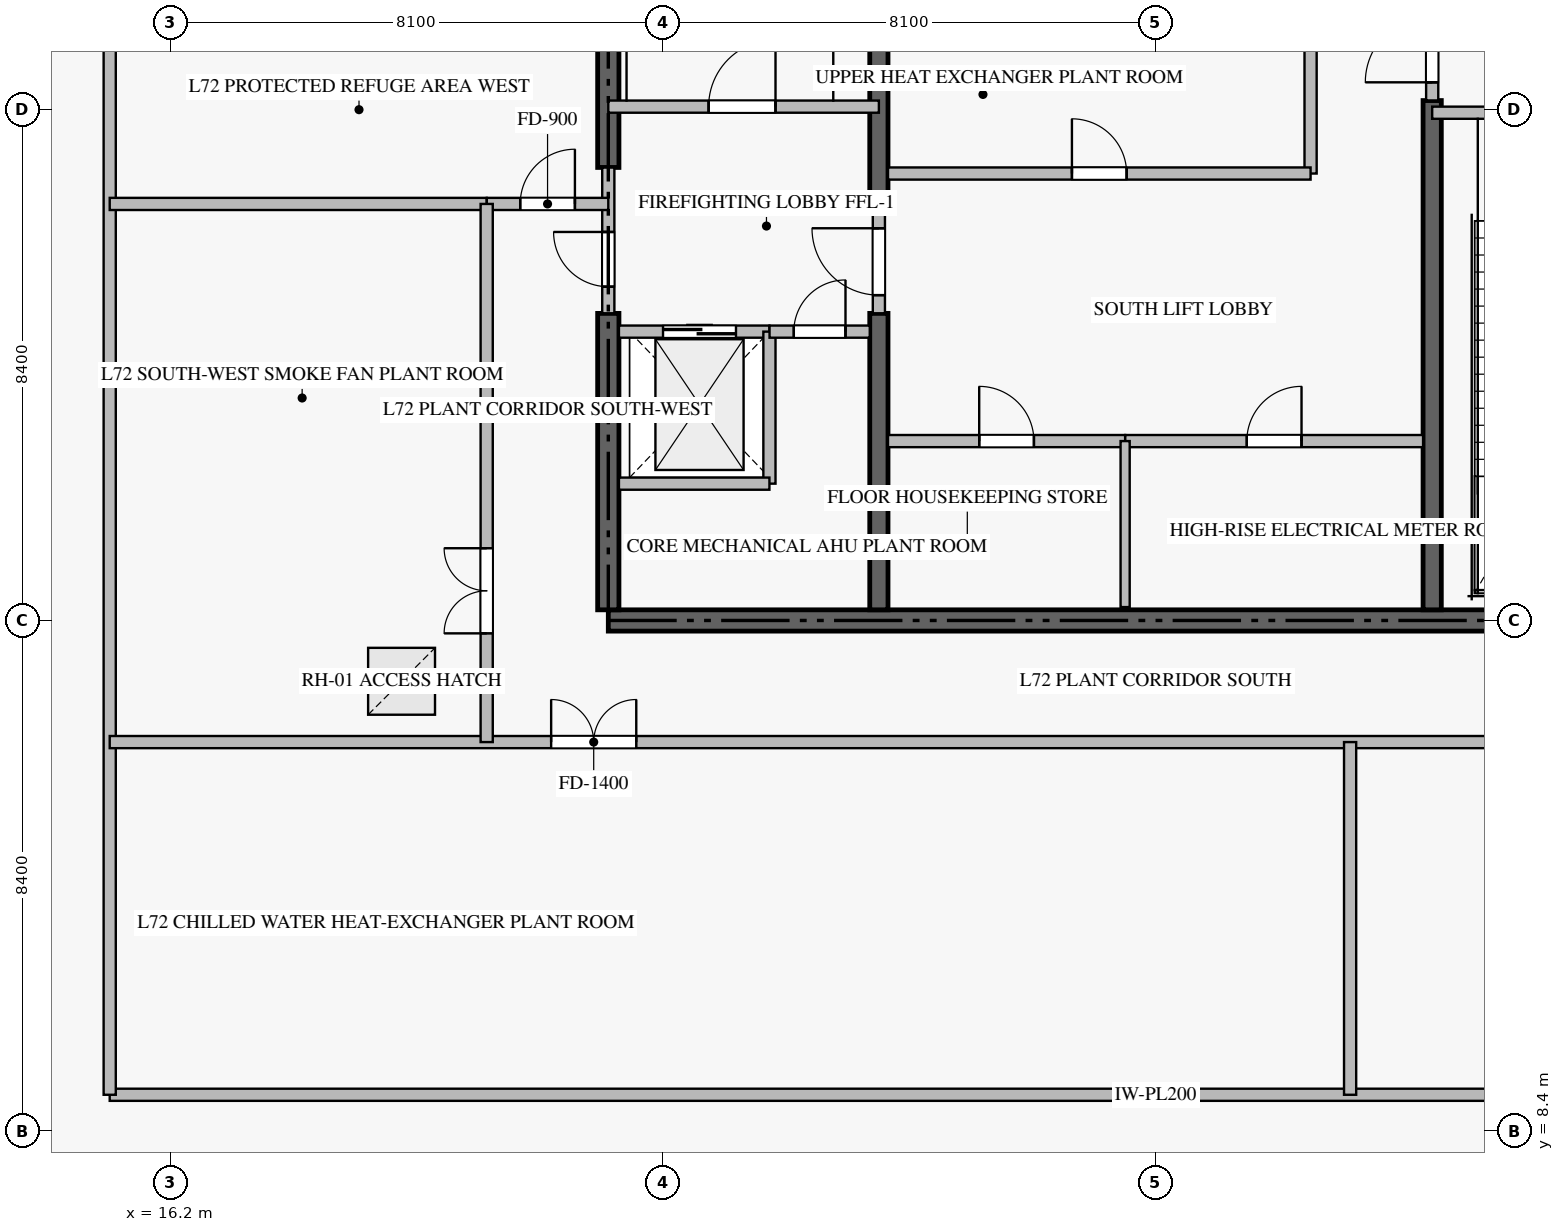
"""IFC4 building model, lengths in metres.
Left out: names, types, materials, properties, quantities, classifications, styles, units other than length and angle.
Written with IfcOpenShell. Run it as: python <this file> out.ifc"""

import sys

from ifc_helpers import new_model, si_unit, direction, frame, frame_2d, origin, origin_2d, place, context, subcontext, project, spatial, rectangle, extrude, source, transform, mapped, element, fill, save


model = new_model("IFC4")
c1 = context("Model", 3, precision=1e-05, world=origin(), true_north=direction((0.0, 1.0)))
c2 = subcontext(c1, "Body", "Model", "MODEL_VIEW")
j1 = project(units=[si_unit("LENGTHUNIT", "METRE"), si_unit("PLANEANGLEUNIT", "RADIAN")], contexts=[c1])
p1 = place(None, origin())
s1 = spatial("IfcSite", under=j1, at=p1, CompositionType="ELEMENT")
p2 = place(p1, origin())
s2 = spatial("IfcBuilding", under=s1, at=p2, CompositionType="ELEMENT")
p3 = place(p2, frame((0.0, 0.0, 287.45)))
s3 = spatial("IfcBuildingStorey", under=s2, at=p3, CompositionType="ELEMENT", Elevation=287.45)
p4 = place(p3, frame((23.4, 16.8, -0.44), z_axis=(0.0, 0.0, 1.0), x_axis=(1.0, 0.0, 0.0)))
e1 = element("IfcWall", 1, at=p4, inside=s3, PredefinedType="SHEAR", context=c2, shape_type="SweptSolid", body=[
    extrude(rectangle(XDim=18.0, YDim=0.35, at=frame_2d((9.0, 0.0))), origin(), (0.0, 0.0, 1.0), 6.178),
])
p5 = place(p3, frame((23.4, 16.975, -0.44), z_axis=(0.0, 0.0, 1.0), x_axis=(0.0, 1.0, 0.0)))
e2 = element("IfcWall", 2, at=p5, inside=s3, PredefinedType="SHEAR", context=c2, shape_type="SweptSolid", body=[
    extrude(rectangle(XDim=4.875, YDim=0.35, at=frame_2d((2.438, 0.0))), origin(), (0.0, 0.0, 1.0), 6.178),
])
p6 = place(p3, frame((23.4, 24.25, -0.44), z_axis=(0.0, 0.0, 1.0), x_axis=(0.0, 1.0, 0.0)))
e3 = element("IfcWall", 3, at=p6, inside=s3, PredefinedType="SHEAR", context=c2, shape_type="SweptSolid", body=[
    extrude(rectangle(XDim=9.175, YDim=0.35, at=frame_2d((4.587, 0.0))), origin(), (0.0, 0.0, 1.0), 6.178),
])
p7 = place(p3, frame((27.85, 16.975, -0.44), z_axis=(0.0, 0.0, 1.0), x_axis=(0.0, 1.0, 0.0)))
e4 = element("IfcWall", 4, at=p7, inside=s3, PredefinedType="SHEAR", context=c2, shape_type="SweptSolid", body=[
    extrude(rectangle(XDim=4.875, YDim=0.3, at=frame_2d((2.438, 0.0))), origin(), (0.0, 0.0, 1.0), 6.178),
])
p8 = place(p3, frame((27.85, 23.55, -0.44), z_axis=(0.0, 0.0, 1.0), x_axis=(0.0, 1.0, 0.0)))
e5 = element("IfcWall", 5, at=p8, inside=s3, PredefinedType="SHEAR", context=c2, shape_type="SweptSolid", body=[
    extrude(rectangle(XDim=9.875, YDim=0.3, at=frame_2d((4.938, 0.0))), origin(), (0.0, 0.0, 1.0), 6.178),
])
p9 = place(p3, frame((36.95, 16.975, -0.44), z_axis=(0.0, 0.0, 1.0), x_axis=(0.0, 1.0, 0.0)))
e6 = element("IfcWall", 6, at=p9, inside=s3, PredefinedType="SHEAR", context=c2, shape_type="SweptSolid", body=[
    extrude(rectangle(XDim=8.375, YDim=0.3, at=frame_2d((4.188, 0.0))), origin(), (0.0, 0.0, 1.0), 6.178),
])
p10 = place(p3, frame((23.4, 25.25, 0.0), z_axis=(0.0, 0.0, 1.0), x_axis=(1.0, 0.0, 0.0)))
e7 = element("IfcWall", 7, at=p10, inside=s3, PredefinedType="STANDARD", context=c2, shape_type="SweptSolid", body=[
    extrude(rectangle(XDim=4.45, YDim=0.2, at=frame_2d((2.225, 0.0))), origin(), (0.0, 0.0, 1.0), 5.74),
])
p11 = place(p10, frame((1.65, 0.0, 0.0)))
e8 = element("IfcOpeningElement", 8, at=p11, cuts=e7, PredefinedType="OPENING", context=c2, shape_type="SweptSolid", body=[
    extrude(rectangle(XDim=1.1, YDim=2.15, at=frame_2d((0.55, 1.075))), frame((0.0, 0.11, 0.0), z_axis=(0.0, -1.0, 0.0), x_axis=(1.0, 0.0, 0.0)), (0.0, 0.0, 1.0), 0.22),
])
p12 = place(p3, frame((36.95, 25.15, 0.0), z_axis=(0.0, 0.0, 1.0), x_axis=(1.0, 0.0, 0.0)))
e9 = element("IfcWall", 9, at=p12, inside=s3, PredefinedType="STANDARD", context=c2, shape_type="SweptSolid", body=[
    extrude(rectangle(XDim=4.45, YDim=0.2, at=frame_2d((2.225, 0.0))), origin(), (0.0, 0.0, 1.0), 5.74),
])
p13 = place(p12, frame((1.65, 0.0, 0.0)))
e10 = element("IfcOpeningElement", 10, at=p13, cuts=e9, PredefinedType="OPENING", context=c2, shape_type="SweptSolid", body=[
    extrude(rectangle(XDim=1.1, YDim=2.15, at=frame_2d((0.55, 1.075))), frame((0.0, 0.11, 0.0), z_axis=(0.0, -1.0, 0.0), x_axis=(1.0, 0.0, 0.0)), (0.0, 0.0, 1.0), 0.22),
])
p14 = place(p3, frame((23.575, 21.55, 0.0), z_axis=(0.0, 0.0, 1.0), x_axis=(1.0, 0.0, 0.0)))
e11 = element("IfcWall", 11, at=p14, inside=s3, PredefinedType="STANDARD", context=c2, shape_type="SweptSolid", body=[
    extrude(rectangle(XDim=2.475, YDim=0.2, at=frame_2d((1.238, 0.0))), origin(), (0.0, 0.0, 1.0), 5.74),
])
p15 = place(p14, frame((0.725, 0.0, 0.0)))
e12 = element("IfcOpeningElement", 12, at=p15, cuts=e11, PredefinedType="OPENING", context=c2, shape_type="SweptSolid", body=[
    extrude(rectangle(XDim=1.2, YDim=2.2, at=frame_2d((0.6, 1.1))), frame((0.0, 0.11, 0.0), z_axis=(0.0, -1.0, 0.0), x_axis=(1.0, 0.0, 0.0)), (0.0, 0.0, 1.0), 0.22),
])
p16 = place(p3, frame((26.05, 19.05, 0.0), z_axis=(0.0, 0.0, 1.0), x_axis=(0.0, 1.0, 0.0)))
e13 = element("IfcWall", 13, at=p16, inside=s3, PredefinedType="STANDARD", context=c2, shape_type="SweptSolid", body=[
    extrude(rectangle(XDim=2.5, YDim=0.2, at=frame_2d((1.25, 0.0))), origin(), (0.0, 0.0, 1.0), 5.74),
])
p17 = place(p3, frame((23.575, 19.05, 0.0), z_axis=(0.0, 0.0, 1.0), x_axis=(1.0, 0.0, 0.0)))
e14 = element("IfcWall", 14, at=p17, inside=s3, PredefinedType="STANDARD", context=c2, shape_type="SweptSolid", body=[
    extrude(rectangle(XDim=2.475, YDim=0.2, at=frame_2d((1.238, 0.0))), origin(), (0.0, 0.0, 1.0), 5.74),
])
p18 = place(p3, frame((26.052, 21.55, 0.0), z_axis=(0.0, 0.0, 1.0), x_axis=(1.0, 0.0, 0.0)))
e15 = element("IfcWall", 15, at=p18, inside=s3, PredefinedType="STANDARD", context=c2, shape_type="SweptSolid", body=[
    extrude(rectangle(XDim=1.648, YDim=0.2, at=frame_2d((0.824, 0.0))), origin(), (0.0, 0.0, 1.0), 5.74),
])
p19 = place(p18, frame((0.399, 0.0, 0.0)))
e16 = element("IfcOpeningElement", 16, at=p19, cuts=e15, PredefinedType="OPENING", context=c2, shape_type="SweptSolid", body=[
    extrude(rectangle(XDim=0.85, YDim=2.1, at=frame_2d((0.425, 1.05))), frame((0.0, 0.11, 0.0), z_axis=(0.0, -1.0, 0.0), x_axis=(1.0, 0.0, 0.0)), (0.0, 0.0, 1.0), 0.22),
])
p20 = place(p3, frame((23.4, 21.852, 0.0), z_axis=(0.0, 0.0, 1.0), x_axis=(0.0, 1.0, 0.0)))
e17 = element("IfcWall", 17, at=p20, inside=s3, PredefinedType="STANDARD", context=c2, shape_type="SweptSolid", body=[
    extrude(rectangle(XDim=2.396, YDim=0.2, at=frame_2d((1.198, 0.0))), origin(), (0.0, 0.0, 1.0), 5.74),
])
p21 = place(p20, frame((0.437, 0.0, 0.0)))
e18 = element("IfcOpeningElement", 18, at=p21, cuts=e17, PredefinedType="OPENING", context=c2, shape_type="SweptSolid", body=[
    extrude(rectangle(XDim=0.9, YDim=2.1, at=frame_2d((0.45, 1.05))), frame((0.0, 0.11, 0.0), z_axis=(0.0, -1.0, 0.0), x_axis=(1.0, 0.0, 0.0)), (0.0, 0.0, 1.0), 0.22),
])
p22 = place(p3, frame((27.85, 21.852, 0.0), z_axis=(0.0, 0.0, 1.0), x_axis=(0.0, 1.0, 0.0)))
e19 = element("IfcWall", 19, at=p22, inside=s3, PredefinedType="STANDARD", context=c2, shape_type="SweptSolid", body=[
    extrude(rectangle(XDim=1.696, YDim=0.2, at=frame_2d((0.848, 0.0))), origin(), (0.0, 0.0, 1.0), 5.74),
])
p23 = place(p22, frame((0.298, 0.0, 0.0)))
e20 = element("IfcOpeningElement", 20, at=p23, cuts=e19, PredefinedType="OPENING", context=c2, shape_type="SweptSolid", body=[
    extrude(rectangle(XDim=1.1, YDim=2.15, at=frame_2d((0.55, 1.075))), frame((0.0, 0.11, 0.0), z_axis=(0.0, -1.0, 0.0), x_axis=(1.0, 0.0, 0.0)), (0.0, 0.0, 1.0), 0.22),
])
p24 = place(p3, frame((36.95, 25.352, 0.0), z_axis=(0.0, 0.0, 1.0), x_axis=(0.0, 1.0, 0.0)))
e21 = element("IfcWall", 21, at=p24, inside=s3, PredefinedType="STANDARD", context=c2, shape_type="SweptSolid", body=[
    extrude(rectangle(XDim=1.696, YDim=0.2, at=frame_2d((0.848, 0.0))), origin(), (0.0, 0.0, 1.0), 5.74),
])
p25 = place(p24, frame((0.298, 0.0, 0.0)))
e22 = element("IfcOpeningElement", 22, at=p25, cuts=e21, PredefinedType="OPENING", context=c2, shape_type="SweptSolid", body=[
    extrude(rectangle(XDim=1.1, YDim=2.15, at=frame_2d((0.55, 1.075))), frame((0.0, 0.11, 0.0), z_axis=(0.0, -1.0, 0.0), x_axis=(1.0, 0.0, 0.0)), (0.0, 0.0, 1.0), 0.22),
])
p26 = place(p3, frame((28.0, 19.75, 0.0), z_axis=(0.0, 0.0, 1.0), x_axis=(1.0, 0.0, 0.0)))
e23 = element("IfcWall", 23, at=p26, inside=s3, PredefinedType="STANDARD", context=c2, shape_type="SweptSolid", body=[
    extrude(rectangle(XDim=3.9, YDim=0.2, at=frame_2d((1.95, 0.0))), origin(), (0.0, 0.0, 1.0), 5.74),
])
p27 = place(p26, frame((1.5, 0.0, 0.0)))
e24 = element("IfcOpeningElement", 24, at=p27, cuts=e23, PredefinedType="OPENING", context=c2, shape_type="SweptSolid", body=[
    extrude(rectangle(XDim=0.9, YDim=2.1, at=frame_2d((0.45, 1.05))), frame((0.0, 0.11, 0.0), z_axis=(0.0, -1.0, 0.0), x_axis=(1.0, 0.0, 0.0)), (0.0, 0.0, 1.0), 0.22),
])
p28 = place(p3, frame((31.902, 19.75, 0.0), z_axis=(0.0, 0.0, 1.0), x_axis=(1.0, 0.0, 0.0)))
e25 = element("IfcWall", 25, at=p28, inside=s3, PredefinedType="STANDARD", context=c2, shape_type="SweptSolid", body=[
    extrude(rectangle(XDim=4.898, YDim=0.2, at=frame_2d((2.449, 0.0))), origin(), (0.0, 0.0, 1.0), 5.74),
])
p29 = place(p28, frame((1.999, 0.0, 0.0)))
e26 = element("IfcOpeningElement", 26, at=p29, cuts=e25, PredefinedType="OPENING", context=c2, shape_type="SweptSolid", body=[
    extrude(rectangle(XDim=0.9, YDim=2.1, at=frame_2d((0.45, 1.05))), frame((0.0, 0.11, 0.0), z_axis=(0.0, -1.0, 0.0), x_axis=(1.0, 0.0, 0.0)), (0.0, 0.0, 1.0), 0.22),
])
p30 = place(p3, frame((31.9, 17.02, 0.0), z_axis=(0.0, 0.0, 1.0), x_axis=(0.0, 1.0, 0.0)))
e27 = element("IfcWall", 27, at=p30, inside=s3, PredefinedType="PARTITIONING", context=c2, shape_type="SweptSolid", body=[
    extrude(rectangle(XDim=2.73, YDim=0.15, at=frame_2d((1.365, 0.0))), origin(), (0.0, 0.0, 1.0), 5.74),
])
p31 = place(p3, frame((34.95, 24.15, 0.0), z_axis=(0.0, 0.0, 1.0), x_axis=(0.0, 1.0, 0.0)))
e28 = element("IfcWall", 28, at=p31, inside=s3, PredefinedType="STANDARD", context=c2, shape_type="SweptSolid", body=[
    extrude(rectangle(XDim=2.8, YDim=0.2, at=frame_2d((1.4, 0.0))), origin(), (0.0, 0.0, 1.0), 5.74),
])
p32 = place(p3, frame((28.0, 24.15, 0.0), z_axis=(0.0, 0.0, 1.0), x_axis=(1.0, 0.0, 0.0)))
e29 = element("IfcWall", 29, at=p32, inside=s3, PredefinedType="STANDARD", context=c2, shape_type="SweptSolid", body=[
    extrude(rectangle(XDim=6.95, YDim=0.2, at=frame_2d((3.475, 0.0))), origin(), (0.0, 0.0, 1.0), 5.74),
])
p33 = place(p32, frame((3.025, 0.0, 0.0)))
e30 = element("IfcOpeningElement", 30, at=p33, cuts=e29, PredefinedType="OPENING", context=c2, shape_type="SweptSolid", body=[
    extrude(rectangle(XDim=0.9, YDim=2.1, at=frame_2d((0.45, 1.05))), frame((0.0, 0.11, 0.0), z_axis=(0.0, -1.0, 0.0), x_axis=(1.0, 0.0, 0.0)), (0.0, 0.0, 1.0), 0.22),
])
p34 = place(p3, frame((15.2, 9.0, 0.0), z_axis=(0.0, 0.0, 1.0), x_axis=(1.0, 0.0, 0.0)))
e31 = element("IfcWall", 31, at=p34, inside=s3, PredefinedType="STANDARD", context=c2, shape_type="SweptSolid", body=[
    extrude(rectangle(XDim=34.4, YDim=0.2, at=frame_2d((17.2, 0.0))), origin(), (0.0, 0.0, 1.0), 5.74),
])
p35 = place(p3, frame((15.2, 9.0, 0.0), z_axis=(0.0, 0.0, 1.0), x_axis=(0.0, 1.0, 0.0)))
e32 = element("IfcWall", 32, at=p35, inside=s3, PredefinedType="STANDARD", context=c2, shape_type="SweptSolid", body=[
    extrude(rectangle(XDim=32.4, YDim=0.2, at=frame_2d((16.2, 0.0))), origin(), (0.0, 0.0, 1.0), 5.74),
])
p36 = place(p3, frame((15.2, 23.65, 0.0), z_axis=(0.0, 0.0, 1.0), x_axis=(1.0, 0.0, 0.0)))
e33 = element("IfcWall", 33, at=p36, inside=s3, PredefinedType="STANDARD", context=c2, shape_type="SweptSolid", body=[
    extrude(rectangle(XDim=6.2, YDim=0.2, at=frame_2d((3.1, 0.0))), origin(), (0.0, 0.0, 1.0), 5.74),
])
p37 = place(p3, frame((21.402, 23.65, 0.0), z_axis=(0.0, 0.0, 1.0), x_axis=(1.0, 0.0, 0.0)))
e34 = element("IfcWall", 34, at=p37, inside=s3, PredefinedType="STANDARD", context=c2, shape_type="SweptSolid", body=[
    extrude(rectangle(XDim=1.998, YDim=0.2, at=frame_2d((0.999, 0.0))), origin(), (0.0, 0.0, 1.0), 5.74),
])
p38 = place(p37, frame((0.549, 0.0, 0.0)))
e35 = element("IfcOpeningElement", 35, at=p38, cuts=e34, PredefinedType="OPENING", context=c2, shape_type="SweptSolid", body=[
    extrude(rectangle(XDim=0.9, YDim=2.1, at=frame_2d((0.45, 1.05))), frame((0.0, 0.11, 0.0), z_axis=(0.0, -1.0, 0.0), x_axis=(1.0, 0.0, 0.0)), (0.0, 0.0, 1.0), 0.22),
])
p39 = place(p3, frame((15.2, 14.8, 0.0), z_axis=(0.0, 0.0, 1.0), x_axis=(1.0, 0.0, 0.0)))
e36 = element("IfcWall", 36, at=p39, inside=s3, PredefinedType="STANDARD", context=c2, shape_type="SweptSolid", body=[
    extrude(rectangle(XDim=34.4, YDim=0.2, at=frame_2d((17.2, 0.0))), origin(), (0.0, 0.0, 1.0), 5.74),
])
p40 = place(p39, frame((7.26, 0.0, 0.0)))
e37 = element("IfcOpeningElement", 37, at=p40, cuts=e36, PredefinedType="OPENING", context=c2, shape_type="SweptSolid", body=[
    extrude(rectangle(XDim=1.4, YDim=2.2, at=frame_2d((0.7, 1.1))), frame((0.0, 0.11, 0.0), z_axis=(0.0, -1.0, 0.0), x_axis=(1.0, 0.0, 0.0)), (0.0, 0.0, 1.0), 0.22),
])
p41 = place(p39, frame((25.74, 0.0, 0.0)))
e38 = element("IfcOpeningElement", 38, at=p41, cuts=e36, PredefinedType="OPENING", context=c2, shape_type="SweptSolid", body=[
    extrude(rectangle(XDim=1.4, YDim=2.2, at=frame_2d((0.7, 1.1))), frame((0.0, 0.11, 0.0), z_axis=(0.0, -1.0, 0.0), x_axis=(1.0, 0.0, 0.0)), (0.0, 0.0, 1.0), 0.22),
])
p42 = place(p3, frame((35.6, 9.0, 0.0), z_axis=(0.0, 0.0, 1.0), x_axis=(0.0, 1.0, 0.0)))
e39 = element("IfcWall", 39, at=p42, inside=s3, PredefinedType="STANDARD", context=c2, shape_type="SweptSolid", body=[
    extrude(rectangle(XDim=5.8, YDim=0.2, at=frame_2d((2.9, 0.0))), origin(), (0.0, 0.0, 1.0), 5.74),
])
p43 = place(p3, frame((21.4, 14.8, 0.0), z_axis=(0.0, 0.0, 1.0), x_axis=(0.0, 1.0, 0.0)))
e40 = element("IfcWall", 40, at=p43, inside=s3, PredefinedType="STANDARD", context=c2, shape_type="SweptSolid", body=[
    extrude(rectangle(XDim=8.85, YDim=0.2, at=frame_2d((4.425, 0.0))), origin(), (0.0, 0.0, 1.0), 5.74),
])
p44 = place(p43, frame((1.788, 0.0, 0.0)))
e41 = element("IfcOpeningElement", 41, at=p44, cuts=e40, PredefinedType="OPENING", context=c2, shape_type="SweptSolid", body=[
    extrude(rectangle(XDim=1.4, YDim=2.2, at=frame_2d((0.7, 1.1))), frame((0.0, 0.11, 0.0), z_axis=(0.0, -1.0, 0.0), x_axis=(1.0, 0.0, 0.0)), (0.0, 0.0, 1.0), 0.22),
])
p45 = place(p2, frame((0.0, 0.0, 293.45)))
p46 = place(p45, frame((0.0, 0.0, -0.26)))
p47 = place(p46, frame((20.0, 15.8, 0.0)))
p48 = place(p47, frame((0.0, 0.0, 0.22)))
e42 = element("IfcDoor", 42, at=p48, inside=s3, OperationType="SINGLE_SWING_LEFT", PredefinedType="TRAPDOOR", context=c2, shape_type="SweptSolid", body=[
    extrude(rectangle(XDim=1.1, YDim=1.1, at=origin_2d()), origin(), (0.0, 0.0, 1.0), 0.04),
])
m1 = source(origin(), c2, "Body", "SweptSolid", [
    extrude(rectangle(XDim=1.1, YDim=2.15, at=frame_2d((0.55, 1.075))), frame((0.0, 0.025, 0.0), z_axis=(0.0, -1.0, 0.0), x_axis=(1.0, 0.0, 0.0)), (0.0, 0.0, 1.0), 0.05),
])
p49 = place(p11, origin())
e43 = element("IfcDoor", 43, at=p49, inside=s3, OperationType="SINGLE_SWING_RIGHT", PredefinedType="DOOR", context=c2, shape_type="MappedRepresentation", body=[
    mapped(m1, transform((0.0, 0.0, 0.0), scale=1.0)),
])
fill(e8, e43)
m2 = source(origin(), c2, "Body", "SweptSolid", [
    extrude(rectangle(XDim=1.2, YDim=2.2, at=frame_2d((0.6, 1.1))), frame((0.0, 0.025, 0.0), z_axis=(0.0, -1.0, 0.0), x_axis=(1.0, 0.0, 0.0)), (0.0, 0.0, 1.0), 0.05),
])
p50 = place(p15, origin())
e44 = element("IfcDoor", 44, at=p50, inside=s3, OperationType="DOUBLE_DOOR_SLIDING", PredefinedType="DOOR", context=c2, shape_type="MappedRepresentation", body=[
    mapped(m2, transform((0.0, 0.0, 0.0), scale=1.0)),
])
fill(e12, e44)
m3 = source(origin(), c2, "Body", "SweptSolid", [
    extrude(rectangle(XDim=0.85, YDim=2.1, at=frame_2d((0.425, 1.05))), frame((0.0, 0.025, 0.0), z_axis=(0.0, -1.0, 0.0), x_axis=(1.0, 0.0, 0.0)), (0.0, 0.0, 1.0), 0.05),
])
p51 = place(p19, origin())
e45 = element("IfcDoor", 45, at=p51, inside=s3, OperationType="SINGLE_SWING_RIGHT", PredefinedType="DOOR", context=c2, shape_type="MappedRepresentation", body=[
    mapped(m3, transform((0.0, 0.0, 0.0), scale=1.0)),
])
fill(e16, e45)
m4 = source(origin(), c2, "Body", "SweptSolid", [
    extrude(rectangle(XDim=0.9, YDim=2.1, at=frame_2d((0.45, 1.05))), frame((0.0, 0.025, 0.0), z_axis=(0.0, -1.0, 0.0), x_axis=(1.0, 0.0, 0.0)), (0.0, 0.0, 1.0), 0.05),
])
p52 = place(p21, origin())
e46 = element("IfcDoor", 46, at=p52, inside=s3, OperationType="SINGLE_SWING_RIGHT", PredefinedType="DOOR", context=c2, shape_type="MappedRepresentation", body=[
    mapped(m4, transform((0.0, 0.0, 0.0), scale=1.0)),
])
fill(e18, e46)
p53 = place(p23, origin())
e47 = element("IfcDoor", 47, at=p53, inside=s3, OperationType="SINGLE_SWING_RIGHT", PredefinedType="DOOR", context=c2, shape_type="MappedRepresentation", body=[
    mapped(m1, transform((0.0, 0.0, 0.0), scale=1.0)),
])
fill(e20, e47)
p54 = place(p25, origin())
e48 = element("IfcDoor", 48, at=p54, inside=s3, OperationType="SINGLE_SWING_LEFT", PredefinedType="DOOR", context=c2, shape_type="MappedRepresentation", body=[
    mapped(m1, transform((0.0, 0.0, 0.0), scale=1.0)),
])
fill(e22, e48)
p55 = place(p27, origin())
e49 = element("IfcDoor", 49, at=p55, inside=s3, OperationType="SINGLE_SWING_LEFT", PredefinedType="DOOR", context=c2, shape_type="MappedRepresentation", body=[
    mapped(m4, transform((0.0, 0.0, 0.0), scale=1.0)),
])
fill(e24, e49)
p56 = place(p29, origin())
e50 = element("IfcDoor", 50, at=p56, inside=s3, OperationType="SINGLE_SWING_RIGHT", PredefinedType="DOOR", context=c2, shape_type="MappedRepresentation", body=[
    mapped(m4, transform((0.0, 0.0, 0.0), scale=1.0)),
])
fill(e26, e50)
p57 = place(p33, origin())
e51 = element("IfcDoor", 51, at=p57, inside=s3, OperationType="SINGLE_SWING_LEFT", PredefinedType="DOOR", context=c2, shape_type="MappedRepresentation", body=[
    mapped(m4, transform((0.0, 0.0, 0.0), scale=1.0)),
])
fill(e30, e51)
p58 = place(p38, origin())
e52 = element("IfcDoor", 52, at=p58, inside=s3, OperationType="SINGLE_SWING_RIGHT", PredefinedType="DOOR", context=c2, shape_type="MappedRepresentation", body=[
    mapped(m4, transform((0.0, 0.0, 0.0), scale=1.0)),
])
fill(e35, e52)
m5 = source(origin(), c2, "Body", "SweptSolid", [
    extrude(rectangle(XDim=1.4, YDim=2.2, at=frame_2d((0.7, 1.1))), frame((0.0, 0.025, 0.0), z_axis=(0.0, -1.0, 0.0), x_axis=(1.0, 0.0, 0.0)), (0.0, 0.0, 1.0), 0.05),
])
p59 = place(p40, origin())
e53 = element("IfcDoor", 53, at=p59, inside=s3, OperationType="DOUBLE_DOOR_SINGLE_SWING", PredefinedType="DOOR", context=c2, shape_type="MappedRepresentation", body=[
    mapped(m5, transform((0.0, 0.0, 0.0), scale=1.0)),
])
fill(e37, e53)
p60 = place(p44, origin())
e54 = element("IfcDoor", 54, at=p60, inside=s3, OperationType="DOUBLE_DOOR_SINGLE_SWING", PredefinedType="DOOR", context=c2, shape_type="MappedRepresentation", body=[
    mapped(m5, transform((0.0, 0.0, 0.0), scale=1.0)),
])
fill(e41, e54)
save(model, sys.argv[1])
